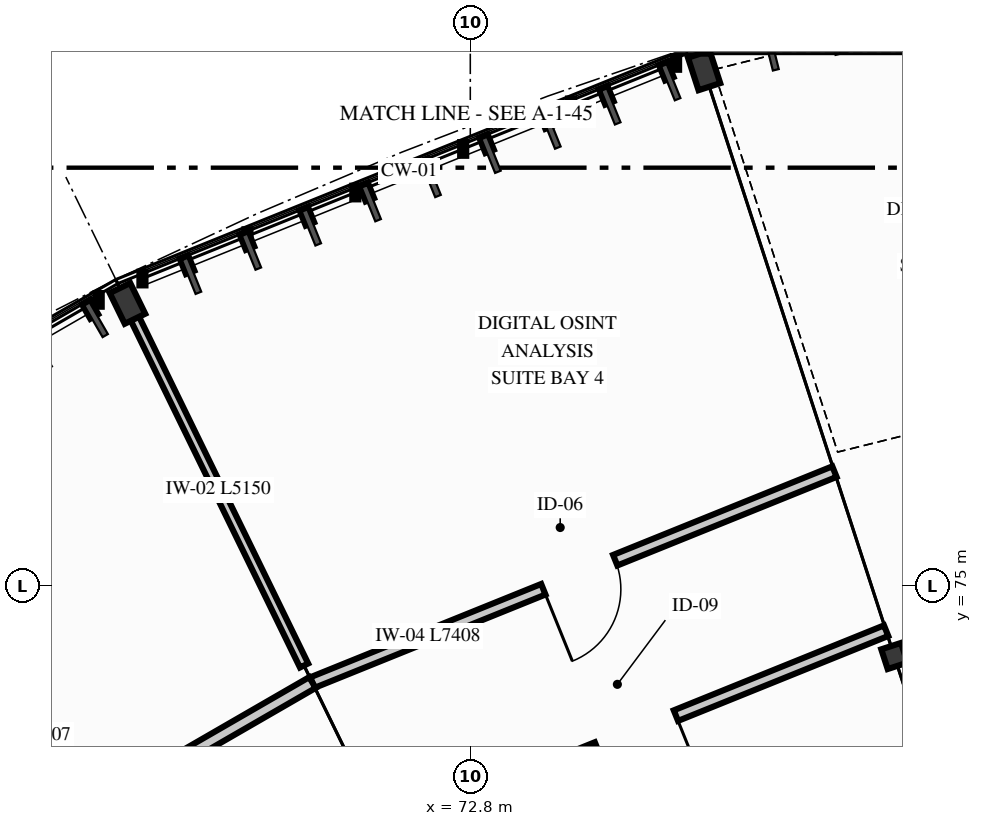
"""IFC4 building model, lengths in metres.
Left out: names, types, materials, properties, quantities, classifications, styles, units other than length and angle.
Written with IfcOpenShell. Run it as: python <this file> out.ifc"""

import sys

from ifc_helpers import new_model, si_unit, direction, frame, frame_2d, origin, origin_2d, place, context, subcontext, project, spatial, rectangle, hollow_circle, i_section, extrude, element, fill, save


model = new_model("IFC4")
c1 = context("Model", 3, precision=1e-05, world=origin(), true_north=direction((0.0, 1.0)))
c2 = subcontext(c1, "Body", "Model", "MODEL_VIEW")
j1 = project(units=[si_unit("LENGTHUNIT", "METRE"), si_unit("PLANEANGLEUNIT", "RADIAN")], contexts=[c1])
p1 = place(None, origin())
s1 = spatial("IfcSite", under=j1, at=p1, CompositionType="ELEMENT")
p2 = place(p1, origin())
s2 = spatial("IfcBuilding", under=s1, at=p2, CompositionType="ELEMENT")
p3 = place(p2, frame((0.0, 0.0, 13.5)))
s3 = spatial("IfcBuildingStorey", under=s2, at=p3, CompositionType="ELEMENT", Elevation=13.5)
p4 = place(p3, frame((78.379, 74.076, 0.0), z_axis=(0.0, 0.0, 1.0), x_axis=(0.951056516295, 0.309016994375, 0.0)))
e1 = element("IfcColumn", 1, at=p4, inside=s3, PredefinedType="COLUMN", context=c2, shape_type="SweptSolid", body=[
    extrude(hollow_circle(Radius=0.136, WallThickness=0.012, at=origin_2d()), origin(), (0.0, 0.0, 1.0), 4.2),
])
for number, where, z_axis, x_axis in (
    (2, (75.876, 81.78, 0.0), (0.0, 0.0, 1.0), (0.951, 0.309, 0.0)),
    (3, (68.29, 78.714, 0.0), (0.0, 0.0, 1.0), (0.899, 0.438, 0.0)),
):
    element("IfcColumn", number, at=place(p3, frame(where, z_axis=z_axis, x_axis=x_axis)), inside=s3, PredefinedType="COLUMN", context=c2, shape_type="SweptSolid", body=[
        extrude(i_section(OverallWidth=0.3, OverallDepth=0.45, WebThickness=0.014, FlangeThickness=0.026, FilletRadius=0.027, at=origin_2d()), origin(), (0.0, 0.0, 1.0), 4.2),
    ])
p5 = place(p3, frame((78.271, 74.409, 0.0), z_axis=(0.0, 0.0, 1.0), x_axis=(-0.927181218568, -0.374613117677, 0.0)))
e4 = element("IfcWall", 4, at=p5, inside=s3, PredefinedType="PARTITIONING", context=c2, shape_type="SweptSolid", body=[
    extrude(rectangle(XDim=7.101, YDim=0.15, at=frame_2d((3.551, 0.0))), origin(), (0.0, 0.0, 1.0), 3.98),
])
p6 = place(p5, frame((2.983, 0.0, 0.0)))
e5 = element("IfcOpeningElement", 5, at=p6, cuts=e4, PredefinedType="OPENING", context=c2, shape_type="SweptSolid", body=[
    extrude(rectangle(XDim=1.12, YDim=2.2, at=frame_2d((0.56, 1.1))), frame((0.0, 0.085, 0.0), z_axis=(0.0, -1.0, 0.0), x_axis=(1.0, 0.0, 0.0)), (0.0, 0.0, 1.0), 0.17),
])
p7 = place(p3, frame((77.591, 76.501, 0.0), z_axis=(0.0, 0.0, 1.0), x_axis=(-0.927187035022, -0.374598721418, 0.0)))
e6 = element("IfcWall", 6, at=p7, inside=s3, PredefinedType="PARTITIONING", context=c2, shape_type="SweptSolid", body=[
    extrude(rectangle(XDim=7.408, YDim=0.15, at=frame_2d((3.704, 0.0))), origin(), (0.0, 0.0, 1.0), 3.98),
])
p8 = place(p7, frame((3.111, 0.0, 0.0)))
e7 = element("IfcOpeningElement", 7, at=p8, cuts=e6, PredefinedType="OPENING", context=c2, shape_type="SweptSolid", body=[
    extrude(rectangle(XDim=1.02, YDim=2.18, at=frame_2d((0.51, 1.09))), frame((0.0, 0.085, 0.0), z_axis=(0.0, -1.0, 0.0), x_axis=(1.0, 0.0, 0.0)), (0.0, 0.0, 1.0), 0.17),
])
p9 = place(p3, frame((70.613, 73.951, 0.0), z_axis=(0.0, 0.0, 1.0), x_axis=(-0.438355450259, 0.898801701839, 0.0)))
e8 = element("IfcWall", 8, at=p9, inside=s3, PredefinedType="PARTITIONING", context=c2, shape_type="SweptSolid", body=[
    extrude(rectangle(XDim=5.15, YDim=0.12, at=frame_2d((2.575, 0.0))), origin(), (0.0, 0.0, 1.0), 3.55),
])
p10 = place(p3, frame((70.722, 73.726, 0.0), z_axis=(0.0, 0.0, 1.0), x_axis=(-0.866019843608, -0.500009630384, 0.0)))
e9 = element("IfcWall", 9, at=p10, inside=s3, PredefinedType="PARTITIONING", context=c2, shape_type="SweptSolid", body=[
    extrude(rectangle(XDim=7.408, YDim=0.165, at=frame_2d((3.704, 0.0))), origin(), (0.0, 0.0, 1.0), 3.98),
])
p11 = place(p10, frame((3.111, 0.0, 0.0)))
e10 = element("IfcOpeningElement", 10, at=p11, cuts=e9, PredefinedType="OPENING", context=c2, shape_type="SweptSolid", body=[
    extrude(rectangle(XDim=1.05, YDim=2.2, at=frame_2d((0.525, 1.1))), frame((0.0, 0.093, 0.0), z_axis=(0.0, -1.0, 0.0), x_axis=(1.0, 0.0, 0.0)), (0.0, 0.0, 1.0), 0.185),
])
p12 = place(p6, origin())
e11 = element("IfcDoor", 11, at=p12, inside=s3, OperationType="SINGLE_SWING_LEFT", PredefinedType="DOOR", context=c2, shape_type="SweptSolid", body=[
    extrude(rectangle(XDim=1.12, YDim=2.2, at=frame_2d((0.56, 1.1))), frame((0.0, 0.025, 0.0), z_axis=(0.0, -1.0, 0.0), x_axis=(1.0, 0.0, 0.0)), (0.0, 0.0, 1.0), 0.05),
])
fill(e5, e11)
p13 = place(p8, origin())
e12 = element("IfcDoor", 12, at=p13, inside=s3, OperationType="SINGLE_SWING_RIGHT", PredefinedType="DOOR", context=c2, shape_type="SweptSolid", body=[
    extrude(rectangle(XDim=1.02, YDim=2.18, at=frame_2d((0.51, 1.09))), frame((0.0, 0.025, 0.0), z_axis=(0.0, -1.0, 0.0), x_axis=(1.0, 0.0, 0.0)), (0.0, 0.0, 1.0), 0.05),
])
fill(e7, e12)
save(model, sys.argv[1])
